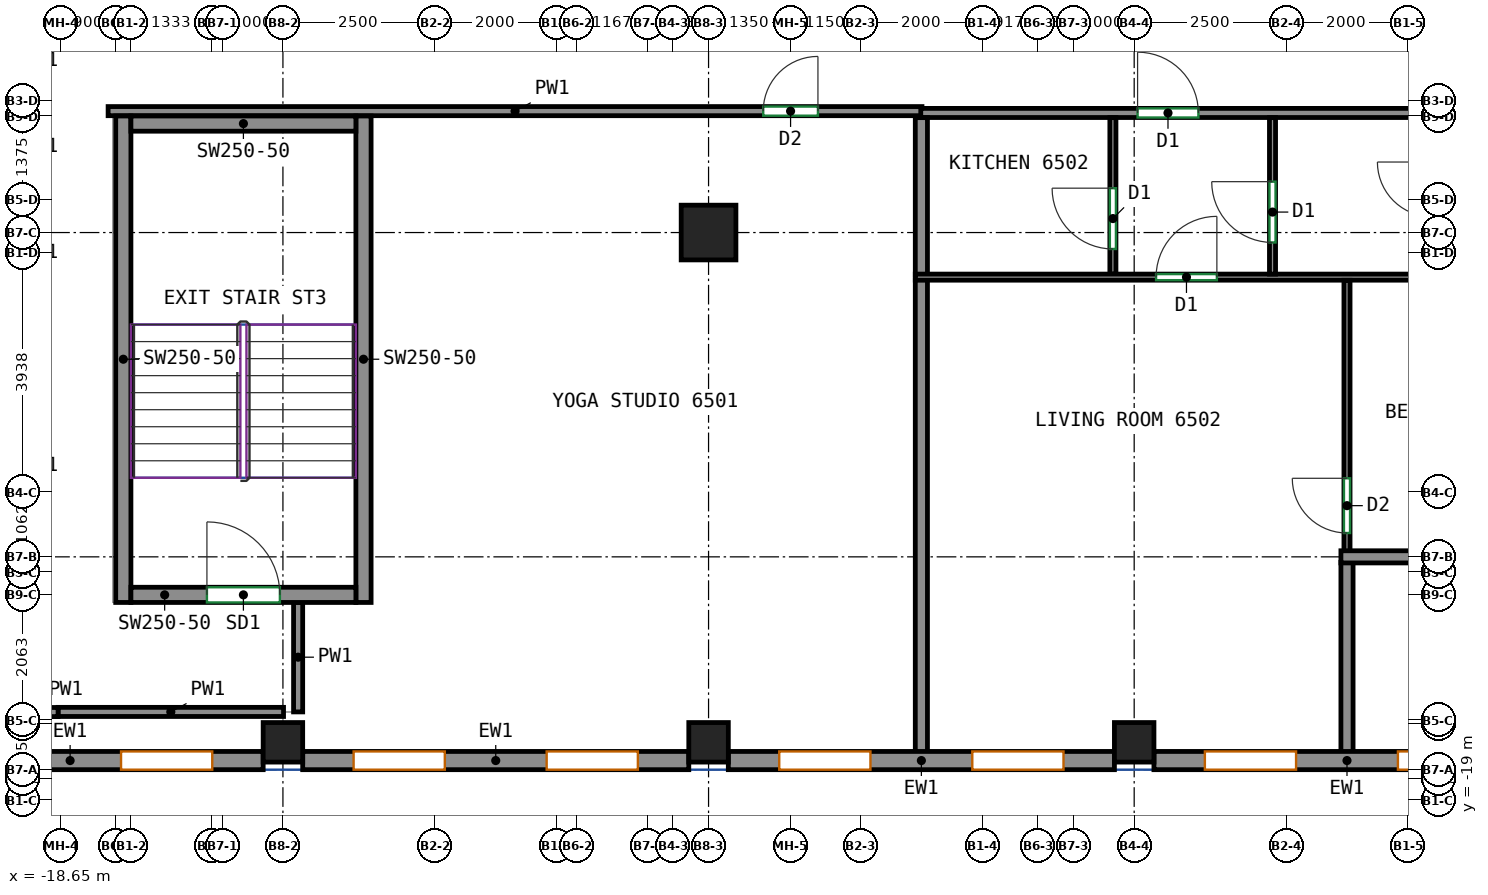
"""IFC4 building model, lengths in metres.
Left out: names, types, materials, properties, quantities, classifications, styles, units other than length and angle.
Written with IfcOpenShell. Run it as: python <this file> out.ifc"""

import sys

from ifc_helpers import new_model, si_unit, direction, frame, frame_2d, origin, origin_2d, place, context, subcontext, project, spatial, rectangle, extrude, source, transform, mapped, element, fill, save


model = new_model("IFC4")
c1 = context("Model", 3, precision=1e-05, world=origin(), true_north=direction((0.0, 1.0)))
c2 = subcontext(c1, "Body", "Model", "MODEL_VIEW")
j1 = project(units=[si_unit("LENGTHUNIT", "METRE"), si_unit("PLANEANGLEUNIT", "RADIAN")], contexts=[c1])
p1 = place(None, origin())
s1 = spatial("IfcSite", under=j1, at=p1, CompositionType="ELEMENT")
p2 = place(p1, origin())
s2 = spatial("IfcBuilding", under=s1, at=p2, CompositionType="ELEMENT")
p3 = place(p2, frame((0.0, 0.0, 267.0)))
s3 = spatial("IfcBuildingStorey", under=s2, at=p3, CompositionType="ELEMENT", Elevation=267.0)
m1 = source(origin(), c2, "Body", "SweptSolid", [
    extrude(rectangle(XDim=0.65, YDim=0.65, at=origin_2d()), origin(), (0.0, 0.0, 1.0), 3.12),
])
for number, where, z_axis, x_axis in (
    (1, (-15.0, -18.05, 0.0), (0.0, 0.0, 1.0), (1.0, 0.0, 0.0)),
    (2, (-8.0, -18.05, 0.0), (0.0, 0.0, 1.0), (1.0, 0.0, 0.0)),
):
    element("IfcColumn", number, at=place(p3, frame(where, z_axis=z_axis, x_axis=x_axis)), inside=s3, PredefinedType="COLUMN", context=c2, shape_type="MappedRepresentation", body=[
        mapped(m1, transform((0.0, 0.0, 0.0))),
    ])
m2 = source(origin(), c2, "Body", "SweptSolid", [
    extrude(rectangle(XDim=0.9, YDim=0.9, at=origin_2d()), origin(), (0.0, 0.0, 1.0), 3.12),
])
p4 = place(p3, frame((-8.0, -9.667, 0.0), z_axis=(0.0, 0.0, 1.0), x_axis=(1.0, 0.0, 0.0)))
e3 = element("IfcColumn", 3, at=p4, inside=s3, PredefinedType="COLUMN", context=c2, shape_type="MappedRepresentation", body=[
    mapped(m2, transform((0.0, 0.0, 0.0))),
])
p5 = place(p3, frame((-1.0, -18.05, 0.0), z_axis=(0.0, 0.0, 1.0), x_axis=(1.0, 0.0, 0.0)))
e4 = element("IfcColumn", 4, at=p5, inside=s3, PredefinedType="COLUMN", context=c2, shape_type="MappedRepresentation", body=[
    mapped(m1, transform((0.0, 0.0, 0.0))),
])
m3 = source(origin(), c2, "Body", "SweptSolid", [
    extrude(rectangle(XDim=8.0, YDim=0.25, at=frame_2d((4.0, 0.0))), origin(), (0.0, 0.0, 1.0), 3.12),
])
for number, where, z_axis, x_axis in (
    (5, (-17.625, -15.75, 0.0), (0.0, 0.0, 1.0), (0.0, 1.0, 0.0)),
    (6, (-13.675, -15.75, 0.0), (0.0, 0.0, 1.0), (0.0, 1.0, 0.0)),
):
    element("IfcWall", number, at=place(p3, frame(where, z_axis=z_axis, x_axis=x_axis)), inside=s3, PredefinedType="SHEAR", context=c2, shape_type="MappedRepresentation", body=[
        mapped(m3, transform((0.0, 0.0, 0.0))),
    ])
m4 = source(origin(), c2, "Body", "SweptSolid", [
    extrude(rectangle(XDim=3.7, YDim=0.25, at=frame_2d((1.85, 0.0))), origin(), (0.0, 0.0, 1.0), 3.12),
])
p6 = place(p3, frame((-17.5, -15.625, 0.0), z_axis=(0.0, 0.0, 1.0), x_axis=(1.0, 0.0, 0.0)))
e7 = element("IfcWall", 7, at=p6, inside=s3, PredefinedType="SHEAR", context=c2, shape_type="MappedRepresentation", body=[
    mapped(m4, transform((0.0, 0.0, 0.0))),
])
p7 = place(p6, frame((1.25, 0.0, 0.0)))
e8 = element("IfcOpeningElement", 8, at=p7, cuts=e7, PredefinedType="OPENING", context=c2, shape_type="SweptSolid", body=[
    extrude(rectangle(XDim=1.2, YDim=2.1, at=frame_2d((0.6, 1.05))), frame((0.0, 0.135, 0.0), z_axis=(0.0, -1.0, 0.0), x_axis=(1.0, 0.0, 0.0)), (0.0, 0.0, 1.0), 0.27),
])
p8 = place(p3, frame((-17.5, -7.875, 0.0), z_axis=(0.0, 0.0, 1.0), x_axis=(1.0, 0.0, 0.0)))
e9 = element("IfcWall", 9, at=p8, inside=s3, PredefinedType="SHEAR", context=c2, shape_type="MappedRepresentation", body=[
    mapped(m4, transform((0.0, 0.0, 0.0))),
])
m5 = source(origin(), c2, "Body", "SweptSolid", [
    extrude(rectangle(XDim=6.35, YDim=0.3, at=frame_2d((3.175, 0.0))), origin(), (0.0, 0.0, 1.0), 3.12),
])
p9 = place(p3, frame((-21.675, -18.35, 0.0), z_axis=(0.0, 0.0, 1.0), x_axis=(1.0, 0.0, 0.0)))
e10 = element("IfcWall", 10, at=p9, inside=s3, PredefinedType="SOLIDWALL", context=c2, shape_type="MappedRepresentation", body=[
    mapped(m5, transform((0.0, 0.0, 0.0))),
])
p10 = place(p9, frame((0.837, 0.0, 0.8)))
e11 = element("IfcOpeningElement", 11, at=p10, cuts=e10, PredefinedType="OPENING", context=c2, shape_type="SweptSolid", body=[
    extrude(rectangle(XDim=1.5, YDim=2.05, at=frame_2d((0.75, 1.025))), frame((0.0, 0.16, 0.0), z_axis=(0.0, -1.0, 0.0), x_axis=(1.0, 0.0, 0.0)), (0.0, 0.0, 1.0), 0.32),
])
p11 = place(p9, frame((4.012, 0.0, 0.8)))
e12 = element("IfcOpeningElement", 12, at=p11, cuts=e10, PredefinedType="OPENING", context=c2, shape_type="SweptSolid", body=[
    extrude(rectangle(XDim=1.5, YDim=2.05, at=frame_2d((0.75, 1.025))), frame((0.0, 0.16, 0.0), z_axis=(0.0, -1.0, 0.0), x_axis=(1.0, 0.0, 0.0)), (0.0, 0.0, 1.0), 0.32),
])
p12 = place(p3, frame((-14.675, -18.35, 0.0), z_axis=(0.0, 0.0, 1.0), x_axis=(1.0, 0.0, 0.0)))
e13 = element("IfcWall", 13, at=p12, inside=s3, PredefinedType="SOLIDWALL", context=c2, shape_type="MappedRepresentation", body=[
    mapped(m5, transform((0.0, 0.0, 0.0))),
])
p13 = place(p12, frame((0.837, 0.0, 0.8)))
e14 = element("IfcOpeningElement", 14, at=p13, cuts=e13, PredefinedType="OPENING", context=c2, shape_type="SweptSolid", body=[
    extrude(rectangle(XDim=1.5, YDim=2.05, at=frame_2d((0.75, 1.025))), frame((0.0, 0.16, 0.0), z_axis=(0.0, -1.0, 0.0), x_axis=(1.0, 0.0, 0.0)), (0.0, 0.0, 1.0), 0.32),
])
p14 = place(p12, frame((4.012, 0.0, 0.8)))
e15 = element("IfcOpeningElement", 15, at=p14, cuts=e13, PredefinedType="OPENING", context=c2, shape_type="SweptSolid", body=[
    extrude(rectangle(XDim=1.5, YDim=2.05, at=frame_2d((0.75, 1.025))), frame((0.0, 0.16, 0.0), z_axis=(0.0, -1.0, 0.0), x_axis=(1.0, 0.0, 0.0)), (0.0, 0.0, 1.0), 0.32),
])
p15 = place(p3, frame((-7.675, -18.35, 0.0), z_axis=(0.0, 0.0, 1.0), x_axis=(1.0, 0.0, 0.0)))
e16 = element("IfcWall", 16, at=p15, inside=s3, PredefinedType="SOLIDWALL", context=c2, shape_type="MappedRepresentation", body=[
    mapped(m5, transform((0.0, 0.0, 0.0))),
])
p16 = place(p15, frame((0.837, 0.0, 0.8)))
e17 = element("IfcOpeningElement", 17, at=p16, cuts=e16, PredefinedType="OPENING", context=c2, shape_type="SweptSolid", body=[
    extrude(rectangle(XDim=1.5, YDim=2.05, at=frame_2d((0.75, 1.025))), frame((0.0, 0.16, 0.0), z_axis=(0.0, -1.0, 0.0), x_axis=(1.0, 0.0, 0.0)), (0.0, 0.0, 1.0), 0.32),
])
p17 = place(p15, frame((4.012, 0.0, 0.8)))
e18 = element("IfcOpeningElement", 18, at=p17, cuts=e16, PredefinedType="OPENING", context=c2, shape_type="SweptSolid", body=[
    extrude(rectangle(XDim=1.5, YDim=2.05, at=frame_2d((0.75, 1.025))), frame((0.0, 0.16, 0.0), z_axis=(0.0, -1.0, 0.0), x_axis=(1.0, 0.0, 0.0)), (0.0, 0.0, 1.0), 0.32),
])
p18 = place(p3, frame((-0.675, -18.35, 0.0), z_axis=(0.0, 0.0, 1.0), x_axis=(1.0, 0.0, 0.0)))
e19 = element("IfcWall", 19, at=p18, inside=s3, PredefinedType="SOLIDWALL", context=c2, shape_type="MappedRepresentation", body=[
    mapped(m5, transform((0.0, 0.0, 0.0))),
])
p19 = place(p18, frame((0.837, 0.0, 0.8)))
e20 = element("IfcOpeningElement", 20, at=p19, cuts=e19, PredefinedType="OPENING", context=c2, shape_type="SweptSolid", body=[
    extrude(rectangle(XDim=1.5, YDim=2.05, at=frame_2d((0.75, 1.025))), frame((0.0, 0.16, 0.0), z_axis=(0.0, -1.0, 0.0), x_axis=(1.0, 0.0, 0.0)), (0.0, 0.0, 1.0), 0.32),
])
p20 = place(p18, frame((4.012, 0.0, 0.8)))
e21 = element("IfcOpeningElement", 21, at=p20, cuts=e19, PredefinedType="OPENING", context=c2, shape_type="SweptSolid", body=[
    extrude(rectangle(XDim=1.5, YDim=2.05, at=frame_2d((0.75, 1.025))), frame((0.0, 0.16, 0.0), z_axis=(0.0, -1.0, 0.0), x_axis=(1.0, 0.0, 0.0)), (0.0, 0.0, 1.0), 0.32),
])
p21 = place(p3, frame((-17.875, -7.67, 0.0), z_axis=(0.0, 0.0, 1.0), x_axis=(1.0, 0.0, 0.0)))
e22 = element("IfcWall", 22, at=p21, inside=s3, PredefinedType="PARTITIONING", context=c2, shape_type="SweptSolid", body=[
    extrude(rectangle(XDim=13.385, YDim=0.15, at=frame_2d((6.692, 0.0))), origin(), (0.0, 0.0, 1.0), 3.12),
])
p22 = place(p21, frame((10.774, 0.0, 0.0)))
e23 = element("IfcOpeningElement", 23, at=p22, cuts=e22, PredefinedType="OPENING", context=c2, shape_type="SweptSolid", body=[
    extrude(rectangle(XDim=0.9, YDim=2.1, at=frame_2d((0.45, 1.05))), frame((0.0, 0.085, 0.0), z_axis=(0.0, -1.0, 0.0), x_axis=(1.0, 0.0, 0.0)), (0.0, 0.0, 1.0), 0.17),
])
p23 = place(p3, frame((-14.75, -17.55, 0.0), z_axis=(0.0, 0.0, 1.0), x_axis=(0.0, 1.0, 0.0)))
e24 = element("IfcWall", 24, at=p23, inside=s3, PredefinedType="PARTITIONING", context=c2, shape_type="SweptSolid", body=[
    extrude(rectangle(XDim=1.8, YDim=0.15, at=frame_2d((0.9, 0.0))), origin(), (0.0, 0.0, 1.0), 3.12),
])
p24 = place(p3, frame((-18.698, -17.55, 0.0), z_axis=(0.0, 0.0, 1.0), x_axis=(1.0, 0.0, 0.0)))
e25 = element("IfcWall", 25, at=p24, inside=s3, PredefinedType="PARTITIONING", context=c2, shape_type="SweptSolid", body=[
    extrude(rectangle(XDim=3.708, YDim=0.15, at=frame_2d((1.854, 0.0))), origin(), (0.0, 0.0, 1.0), 3.12),
])
p25 = place(p3, frame((-19.677, -17.552, 0.0), z_axis=(0.0, 0.0, 1.0), x_axis=(1.0, 0.0, 0.0)))
e26 = element("IfcWall", 26, at=p25, inside=s3, PredefinedType="PARTITIONING", context=c2, shape_type="SweptSolid", body=[
    extrude(rectangle(XDim=0.979, YDim=0.15, at=frame_2d((0.49, 0.0))), origin(), (0.0, 0.0, 1.0), 3.12),
])
p26 = place(p3, frame((-4.51, -7.7, 0.0), z_axis=(0.0, 0.0, 1.0), x_axis=(1.0, 0.0, 0.0)))
e27 = element("IfcWall", 27, at=p26, inside=s3, PredefinedType="PARTITIONING", context=c2, shape_type="SweptSolid", body=[
    extrude(rectangle(XDim=19.76, YDim=0.15, at=frame_2d((9.88, 0.0))), origin(), (0.0, 0.0, 1.0), 3.12),
])
p27 = place(p26, frame((3.566, 0.0, 0.0)))
e28 = element("IfcOpeningElement", 28, at=p27, cuts=e27, PredefinedType="OPENING", context=c2, shape_type="SweptSolid", body=[
    extrude(rectangle(XDim=1.0, YDim=2.1, at=frame_2d((0.5, 1.05))), frame((0.0, 0.085, 0.0), z_axis=(0.0, -1.0, 0.0), x_axis=(1.0, 0.0, 0.0)), (0.0, 0.0, 1.0), 0.17),
])
p28 = place(p26, frame((16.08, 0.0, 0.0)))
e29 = element("IfcOpeningElement", 29, at=p28, cuts=e27, PredefinedType="OPENING", context=c2, shape_type="SweptSolid", body=[
    extrude(rectangle(XDim=1.0, YDim=2.1, at=frame_2d((0.5, 1.05))), frame((0.0, 0.085, 0.0), z_axis=(0.0, -1.0, 0.0), x_axis=(1.0, 0.0, 0.0)), (0.0, 0.0, 1.0), 0.17),
])
p29 = place(p3, frame((-4.5, -10.36, 0.0), z_axis=(0.0, 0.0, 1.0), x_axis=(0.0, 1.0, 0.0)))
e30 = element("IfcWall", 30, at=p29, inside=s3, PredefinedType="PARTITIONING", context=c2, shape_type="SweptSolid", body=[
    extrude(rectangle(XDim=2.583, YDim=0.2, at=frame_2d((1.292, 0.0))), origin(), (0.0, 0.0, 1.0), 3.12),
])
p30 = place(p3, frame((-4.5, -18.25, 0.0), z_axis=(0.0, 0.0, 1.0), x_axis=(0.0, 1.0, 0.0)))
e31 = element("IfcWall", 31, at=p30, inside=s3, PredefinedType="PARTITIONING", context=c2, shape_type="SweptSolid", body=[
    extrude(rectangle(XDim=7.808, YDim=0.2, at=frame_2d((3.904, 0.0))), origin(), (0.0, 0.0, 1.0), 3.12),
])
p31 = place(p3, frame((-1.35, -10.35, 0.0), z_axis=(0.0, 0.0, 1.0), x_axis=(0.0, 1.0, 0.0)))
e32 = element("IfcWall", 32, at=p31, inside=s3, PredefinedType="PARTITIONING", context=c2, shape_type="SweptSolid", body=[
    extrude(rectangle(XDim=2.573, YDim=0.1, at=frame_2d((1.287, 0.0))), origin(), (0.0, 0.0, 1.0), 3.12),
])
p32 = place(p31, frame((0.413, 0.0, 0.0)))
e33 = element("IfcOpeningElement", 33, at=p32, cuts=e32, PredefinedType="OPENING", context=c2, shape_type="SweptSolid", body=[
    extrude(rectangle(XDim=1.0, YDim=2.1, at=frame_2d((0.5, 1.05))), frame((0.0, 0.06, 0.0), z_axis=(0.0, -1.0, 0.0), x_axis=(1.0, 0.0, 0.0)), (0.0, 0.0, 1.0), 0.12),
])
p33 = place(p3, frame((-4.6, -10.4, 0.0), z_axis=(0.0, 0.0, 1.0), x_axis=(1.0, 0.0, 0.0)))
e34 = element("IfcWall", 34, at=p33, inside=s3, PredefinedType="PARTITIONING", context=c2, shape_type="SweptSolid", body=[
    extrude(rectangle(XDim=22.35, YDim=0.1, at=frame_2d((11.175, 0.0))), origin(), (0.0, 0.0, 1.0), 3.12),
])
p34 = place(p33, frame((3.96, 0.0, 0.0)))
e35 = element("IfcOpeningElement", 35, at=p34, cuts=e34, PredefinedType="OPENING", context=c2, shape_type="SweptSolid", body=[
    extrude(rectangle(XDim=1.0, YDim=2.1, at=frame_2d((0.5, 1.05))), frame((0.0, 0.06, 0.0), z_axis=(0.0, -1.0, 0.0), x_axis=(1.0, 0.0, 0.0)), (0.0, 0.0, 1.0), 0.12),
])
p35 = place(p33, frame((15.666, 0.0, 0.0)))
e36 = element("IfcOpeningElement", 36, at=p35, cuts=e34, PredefinedType="OPENING", context=c2, shape_type="SweptSolid", body=[
    extrude(rectangle(XDim=1.0, YDim=2.1, at=frame_2d((0.5, 1.05))), frame((0.0, 0.06, 0.0), z_axis=(0.0, -1.0, 0.0), x_axis=(1.0, 0.0, 0.0)), (0.0, 0.0, 1.0), 0.12),
])
p36 = place(p33, frame((18.109, 0.0, 0.0)))
e37 = element("IfcOpeningElement", 37, at=p36, cuts=e34, PredefinedType="OPENING", context=c2, shape_type="SweptSolid", body=[
    extrude(rectangle(XDim=1.0, YDim=2.1, at=frame_2d((0.5, 1.05))), frame((0.0, 0.06, 0.0), z_axis=(0.0, -1.0, 0.0), x_axis=(1.0, 0.0, 0.0)), (0.0, 0.0, 1.0), 0.12),
])
p37 = place(p3, frame((1.275, -10.35, 0.0), z_axis=(0.0, 0.0, 1.0), x_axis=(0.0, 1.0, 0.0)))
e38 = element("IfcWall", 38, at=p37, inside=s3, PredefinedType="PARTITIONING", context=c2, shape_type="SweptSolid", body=[
    extrude(rectangle(XDim=2.573, YDim=0.1, at=frame_2d((1.287, 0.0))), origin(), (0.0, 0.0, 1.0), 3.12),
])
p38 = place(p37, frame((0.52, 0.0, 0.0)))
e39 = element("IfcOpeningElement", 39, at=p38, cuts=e38, PredefinedType="OPENING", context=c2, shape_type="SweptSolid", body=[
    extrude(rectangle(XDim=1.0, YDim=2.1, at=frame_2d((0.5, 1.05))), frame((0.0, 0.06, 0.0), z_axis=(0.0, -1.0, 0.0), x_axis=(1.0, 0.0, 0.0)), (0.0, 0.0, 1.0), 0.12),
])
p39 = place(p3, frame((2.5, -14.91, 0.0), z_axis=(0.0, 0.0, 1.0), x_axis=(0.0, 1.0, 0.0)))
e40 = element("IfcWall", 40, at=p39, inside=s3, PredefinedType="PARTITIONING", context=c2, shape_type="SweptSolid", body=[
    extrude(rectangle(XDim=4.458, YDim=0.1, at=frame_2d((2.229, 0.0))), origin(), (0.0, 0.0, 1.0), 3.12),
])
p40 = place(p39, frame((0.302, 0.0, 0.0)))
e41 = element("IfcOpeningElement", 41, at=p40, cuts=e40, PredefinedType="OPENING", context=c2, shape_type="SweptSolid", body=[
    extrude(rectangle(XDim=0.9, YDim=2.1, at=frame_2d((0.45, 1.05))), frame((0.0, 0.06, 0.0), z_axis=(0.0, -1.0, 0.0), x_axis=(1.0, 0.0, 0.0)), (0.0, 0.0, 1.0), 0.12),
])
p41 = place(p3, frame((2.5, -18.25, 0.0), z_axis=(0.0, 0.0, 1.0), x_axis=(0.0, 1.0, 0.0)))
e42 = element("IfcWall", 42, at=p41, inside=s3, PredefinedType="PARTITIONING", context=c2, shape_type="SweptSolid", body=[
    extrude(rectangle(XDim=3.16, YDim=0.2, at=frame_2d((1.58, 0.0))), origin(), (0.0, 0.0, 1.0), 3.12),
])
p42 = place(p3, frame((2.4, -15.0, 0.0), z_axis=(0.0, 0.0, 1.0), x_axis=(1.0, 0.0, 0.0)))
e43 = element("IfcWall", 43, at=p42, inside=s3, PredefinedType="PARTITIONING", context=c2, shape_type="SweptSolid", body=[
    extrude(rectangle(XDim=3.7, YDim=0.2, at=frame_2d((1.85, 0.0))), origin(), (0.0, 0.0, 1.0), 3.12),
])
p43 = place(p11, origin())
e44 = element("IfcWindow", 44, at=p43, inside=s3, PartitioningType="SINGLE_PANEL", PredefinedType="WINDOW", context=c2, shape_type="SweptSolid", body=[
    extrude(rectangle(XDim=1.5, YDim=2.05, at=frame_2d((0.75, 1.025))), frame((0.0, 0.03, 0.0), z_axis=(0.0, -1.0, 0.0), x_axis=(1.0, 0.0, 0.0)), (0.0, 0.0, 1.0), 0.06),
])
fill(e12, e44)
p44 = place(p13, origin())
e45 = element("IfcWindow", 45, at=p44, inside=s3, PartitioningType="SINGLE_PANEL", PredefinedType="WINDOW", context=c2, shape_type="SweptSolid", body=[
    extrude(rectangle(XDim=1.5, YDim=2.05, at=frame_2d((0.75, 1.025))), frame((0.0, 0.03, 0.0), z_axis=(0.0, -1.0, 0.0), x_axis=(1.0, 0.0, 0.0)), (0.0, 0.0, 1.0), 0.06),
])
fill(e14, e45)
p45 = place(p14, origin())
e46 = element("IfcWindow", 46, at=p45, inside=s3, PartitioningType="SINGLE_PANEL", PredefinedType="WINDOW", context=c2, shape_type="SweptSolid", body=[
    extrude(rectangle(XDim=1.5, YDim=2.05, at=frame_2d((0.75, 1.025))), frame((0.0, 0.03, 0.0), z_axis=(0.0, -1.0, 0.0), x_axis=(1.0, 0.0, 0.0)), (0.0, 0.0, 1.0), 0.06),
])
fill(e15, e46)
p46 = place(p16, origin())
e47 = element("IfcWindow", 47, at=p46, inside=s3, PartitioningType="SINGLE_PANEL", PredefinedType="WINDOW", context=c2, shape_type="SweptSolid", body=[
    extrude(rectangle(XDim=1.5, YDim=2.05, at=frame_2d((0.75, 1.025))), frame((0.0, 0.03, 0.0), z_axis=(0.0, -1.0, 0.0), x_axis=(1.0, 0.0, 0.0)), (0.0, 0.0, 1.0), 0.06),
])
fill(e17, e47)
p47 = place(p17, origin())
e48 = element("IfcWindow", 48, at=p47, inside=s3, PartitioningType="SINGLE_PANEL", PredefinedType="WINDOW", context=c2, shape_type="SweptSolid", body=[
    extrude(rectangle(XDim=1.5, YDim=2.05, at=frame_2d((0.75, 1.025))), frame((0.0, 0.03, 0.0), z_axis=(0.0, -1.0, 0.0), x_axis=(1.0, 0.0, 0.0)), (0.0, 0.0, 1.0), 0.06),
])
fill(e18, e48)
p48 = place(p19, origin())
e49 = element("IfcWindow", 49, at=p48, inside=s3, PartitioningType="SINGLE_PANEL", PredefinedType="WINDOW", context=c2, shape_type="SweptSolid", body=[
    extrude(rectangle(XDim=1.5, YDim=2.05, at=frame_2d((0.75, 1.025))), frame((0.0, 0.03, 0.0), z_axis=(0.0, -1.0, 0.0), x_axis=(1.0, 0.0, 0.0)), (0.0, 0.0, 1.0), 0.06),
])
fill(e20, e49)
p49 = place(p20, origin())
e50 = element("IfcWindow", 50, at=p49, inside=s3, PartitioningType="SINGLE_PANEL", PredefinedType="WINDOW", context=c2, shape_type="SweptSolid", body=[
    extrude(rectangle(XDim=1.5, YDim=2.05, at=frame_2d((0.75, 1.025))), frame((0.0, 0.03, 0.0), z_axis=(0.0, -1.0, 0.0), x_axis=(1.0, 0.0, 0.0)), (0.0, 0.0, 1.0), 0.06),
])
fill(e21, e50)
p50 = place(p7, origin())
e51 = element("IfcDoor", 51, at=p50, inside=s3, OperationType="DOUBLE_DOOR_SINGLE_SWING", PredefinedType="DOOR", context=c2, shape_type="SweptSolid", body=[
    extrude(rectangle(XDim=1.2, YDim=2.1, at=frame_2d((0.6, 1.05))), frame((0.0, 0.025, 0.0), z_axis=(0.0, -1.0, 0.0), x_axis=(1.0, 0.0, 0.0)), (0.0, 0.0, 1.0), 0.05),
])
fill(e8, e51)
p51 = place(p40, origin())
e52 = element("IfcDoor", 52, at=p51, inside=s3, OperationType="SINGLE_SWING_RIGHT", PredefinedType="DOOR", context=c2, shape_type="SweptSolid", body=[
    extrude(rectangle(XDim=0.9, YDim=2.1, at=frame_2d((0.45, 1.05))), frame((0.0, 0.025, 0.0), z_axis=(0.0, -1.0, 0.0), x_axis=(1.0, 0.0, 0.0)), (0.0, 0.0, 1.0), 0.05),
])
fill(e41, e52)
p52 = place(p34, origin())
e53 = element("IfcDoor", 53, at=p52, inside=s3, OperationType="SINGLE_SWING_RIGHT", PredefinedType="DOOR", context=c2, shape_type="SweptSolid", body=[
    extrude(rectangle(XDim=1.0, YDim=2.1, at=frame_2d((0.5, 1.05))), frame((0.0, 0.025, 0.0), z_axis=(0.0, -1.0, 0.0), x_axis=(1.0, 0.0, 0.0)), (0.0, 0.0, 1.0), 0.05),
])
fill(e35, e53)
p53 = place(p32, origin())
e54 = element("IfcDoor", 54, at=p53, inside=s3, OperationType="SINGLE_SWING_RIGHT", PredefinedType="DOOR", context=c2, shape_type="SweptSolid", body=[
    extrude(rectangle(XDim=1.0, YDim=2.1, at=frame_2d((0.5, 1.05))), frame((0.0, 0.025, 0.0), z_axis=(0.0, -1.0, 0.0), x_axis=(1.0, 0.0, 0.0)), (0.0, 0.0, 1.0), 0.05),
])
fill(e33, e54)
p54 = place(p38, origin())
e55 = element("IfcDoor", 55, at=p54, inside=s3, OperationType="SINGLE_SWING_RIGHT", PredefinedType="DOOR", context=c2, shape_type="SweptSolid", body=[
    extrude(rectangle(XDim=1.0, YDim=2.1, at=frame_2d((0.5, 1.05))), frame((0.0, 0.025, 0.0), z_axis=(0.0, -1.0, 0.0), x_axis=(1.0, 0.0, 0.0)), (0.0, 0.0, 1.0), 0.05),
])
fill(e39, e55)
p55 = place(p27, origin())
e56 = element("IfcDoor", 56, at=p55, inside=s3, OperationType="SINGLE_SWING_LEFT", PredefinedType="DOOR", context=c2, shape_type="SweptSolid", body=[
    extrude(rectangle(XDim=1.0, YDim=2.1, at=frame_2d((0.5, 1.05))), frame((0.0, 0.025, 0.0), z_axis=(0.0, -1.0, 0.0), x_axis=(1.0, 0.0, 0.0)), (0.0, 0.0, 1.0), 0.05),
])
fill(e28, e56)
p56 = place(p22, origin())
e57 = element("IfcDoor", 57, at=p56, inside=s3, OperationType="SINGLE_SWING_RIGHT", PredefinedType="DOOR", context=c2, shape_type="SweptSolid", body=[
    extrude(rectangle(XDim=0.9, YDim=2.1, at=frame_2d((0.45, 1.05))), frame((0.0, 0.025, 0.0), z_axis=(0.0, -1.0, 0.0), x_axis=(1.0, 0.0, 0.0)), (0.0, 0.0, 1.0), 0.05),
])
fill(e23, e57)
save(model, sys.argv[1])
